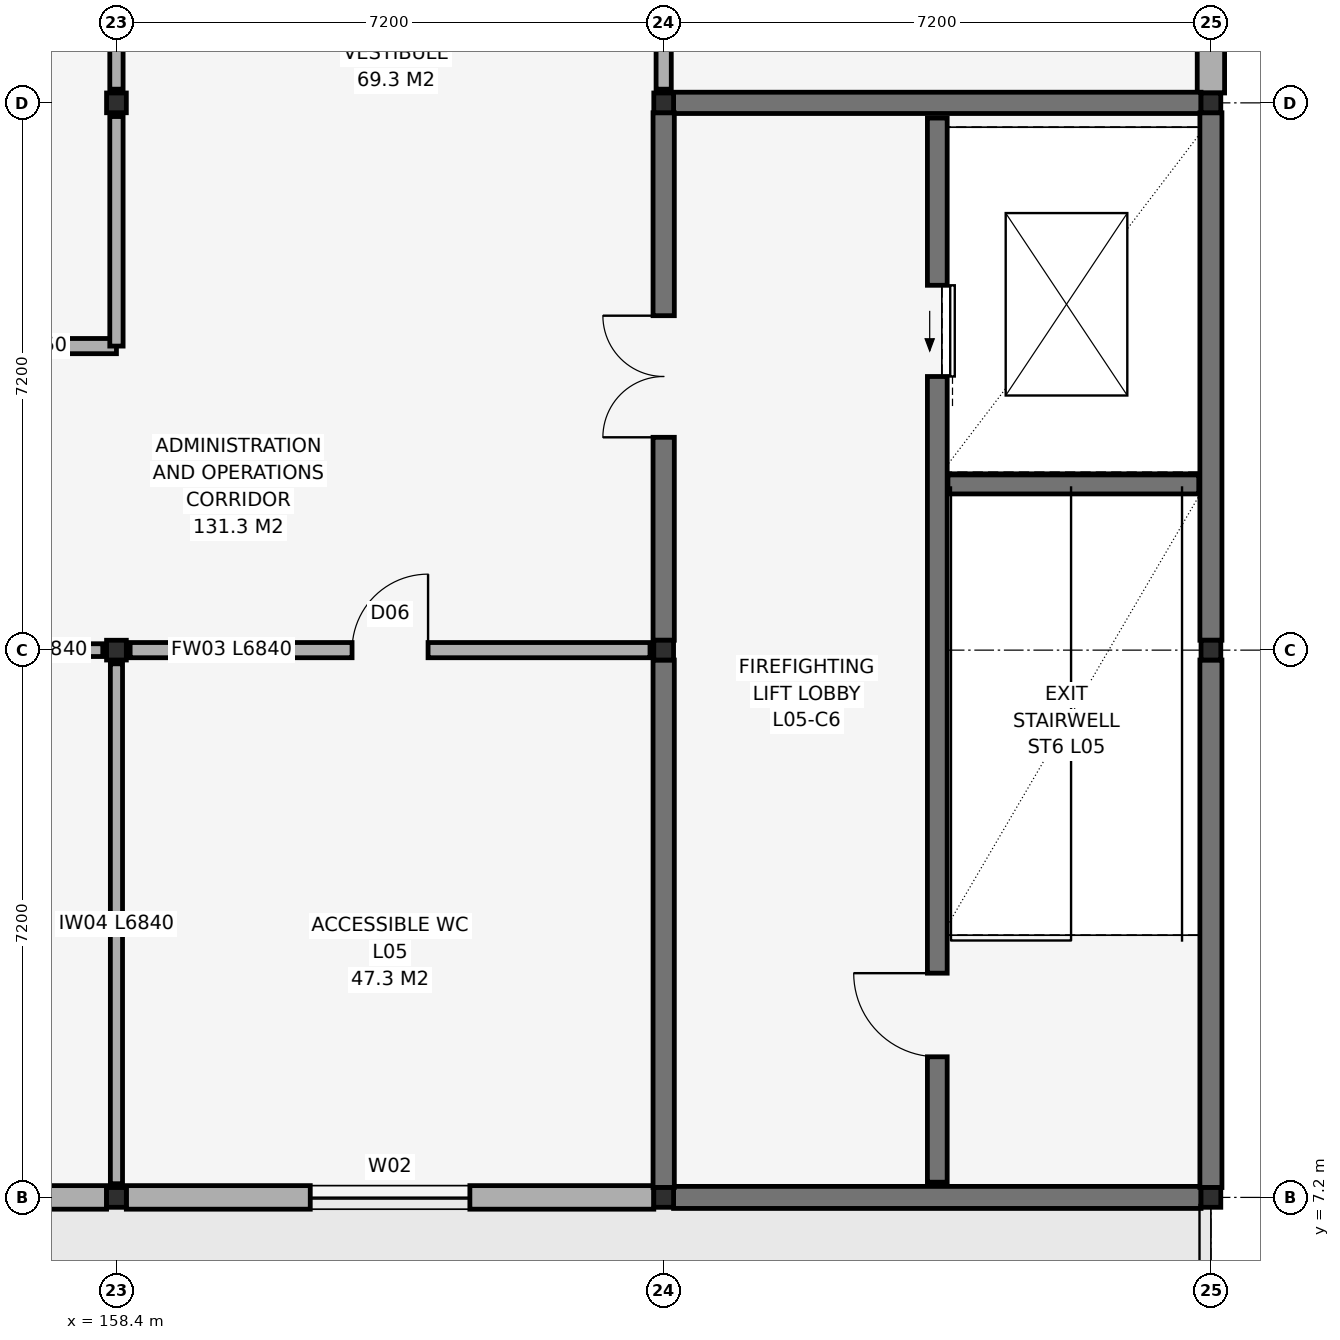
"""IFC4 building model, lengths in metres.
Left out: names, types, materials, properties, quantities, classifications, styles, units other than length and angle.
Written with IfcOpenShell. Run it as: python <this file> out.ifc"""

import sys

from ifc_helpers import new_model, si_unit, direction, frame, frame_2d, origin, origin_2d, place, context, subcontext, project, spatial, rectangle, hollow_rectangle, extrude, element, fill, save


model = new_model("IFC4")
c1 = context("Model", 3, precision=1e-05, world=origin(), true_north=direction((0.0, 1.0)))
c2 = subcontext(c1, "Body", "Model", "MODEL_VIEW")
j1 = project(units=[si_unit("LENGTHUNIT", "METRE"), si_unit("PLANEANGLEUNIT", "RADIAN")], contexts=[c1])
p1 = place(None, origin())
s1 = spatial("IfcSite", under=j1, at=p1, CompositionType="ELEMENT")
p2 = place(p1, origin())
s2 = spatial("IfcBuilding", under=s1, at=p2, CompositionType="ELEMENT")
p3 = place(p2, frame((0.0, 0.0, 23.4)))
s3 = spatial("IfcBuildingStorey", under=s2, at=p3, CompositionType="ELEMENT", Elevation=23.4)
for number, where, z_axis, x_axis in (
    (1, (158.4, 7.2, 0.0), (0.0, 0.0, 1.0), (1.0, 0.0, 0.0)),
    (2, (158.4, 14.4, 0.0), (0.0, 0.0, 1.0), (1.0, 0.0, 0.0)),
    (3, (158.4, 21.6, 0.0), (0.0, 0.0, 1.0), (1.0, 0.0, 0.0)),
    (4, (165.6, 7.2, 0.0), (0.0, 0.0, 1.0), (1.0, 0.0, 0.0)),
    (5, (165.6, 14.4, 0.0), (0.0, 0.0, 1.0), (1.0, 0.0, 0.0)),
    (6, (165.6, 21.6, 0.0), (0.0, 0.0, 1.0), (1.0, 0.0, 0.0)),
    (7, (172.8, 7.2, 0.0), (0.0, 0.0, 1.0), (1.0, 0.0, 0.0)),
    (8, (172.8, 14.4, 0.0), (0.0, 0.0, 1.0), (1.0, 0.0, 0.0)),
    (9, (172.8, 21.6, 0.0), (0.0, 0.0, 1.0), (1.0, 0.0, 0.0)),
):
    element("IfcColumn", number, at=place(p3, frame(where, z_axis=z_axis, x_axis=x_axis)), inside=s3, PredefinedType="COLUMN", context=c2, shape_type="SweptSolid", body=[
        extrude(hollow_rectangle(XDim=0.26, YDim=0.26, WallThickness=0.012, at=origin_2d()), origin(), (0.0, 0.0, 1.0), 4.2),
    ])
p4 = place(p3, frame((151.33, 7.2, 0.0), z_axis=(0.0, 0.0, 1.0), x_axis=(1.0, 0.0, 0.0)))
e10 = element("IfcWall", 10, at=p4, inside=s3, PredefinedType="SOLIDWALL", context=c2, shape_type="SweptSolid", body=[
    extrude(rectangle(XDim=6.94, YDim=0.31, at=frame_2d((3.47, 0.0))), origin(), (0.0, 0.0, 1.0), 3.98),
])
p5 = place(p4, frame((2.07, 0.0, 0.95)))
e11 = element("IfcOpeningElement", 11, at=p5, cuts=e10, PredefinedType="OPENING", context=c2, shape_type="SweptSolid", body=[
    extrude(rectangle(XDim=2.8, YDim=1.5, at=frame_2d((1.4, 0.75))), frame((0.0, 0.17, 0.0), z_axis=(0.0, -1.0, 0.0), x_axis=(1.0, 0.0, 0.0)), (0.0, 0.0, 1.0), 0.34),
])
p6 = place(p3, frame((158.53, 7.2, 0.0), z_axis=(0.0, 0.0, 1.0), x_axis=(1.0, 0.0, 0.0)))
e12 = element("IfcWall", 12, at=p6, inside=s3, PredefinedType="SOLIDWALL", context=c2, shape_type="SweptSolid", body=[
    extrude(rectangle(XDim=6.94, YDim=0.31, at=frame_2d((3.47, 0.0))), origin(), (0.0, 0.0, 1.0), 3.98),
])
p7 = place(p6, frame((2.42, 0.0, 0.95)))
e13 = element("IfcOpeningElement", 13, at=p7, cuts=e12, PredefinedType="OPENING", context=c2, shape_type="SweptSolid", body=[
    extrude(rectangle(XDim=2.1, YDim=2.65, at=frame_2d((1.05, 1.325))), frame((0.0, 0.17, 0.0), z_axis=(0.0, -1.0, 0.0), x_axis=(1.0, 0.0, 0.0)), (0.0, 0.0, 1.0), 0.34),
])
p8 = place(p3, frame((172.8, 21.73, 0.0), z_axis=(0.0, 0.0, 1.0), x_axis=(0.0, 1.0, 0.0)))
e14 = element("IfcWall", 14, at=p8, inside=s3, PredefinedType="SOLIDWALL", context=c2, shape_type="SweptSolid", body=[
    extrude(rectangle(XDim=6.94, YDim=0.36, at=frame_2d((3.47, 0.0))), origin(), (0.0, 0.0, 1.0), 3.98),
])
p9 = place(p8, frame((2.42, 0.0, 0.95)))
e15 = element("IfcOpeningElement", 15, at=p9, cuts=e14, PredefinedType="OPENING", context=c2, shape_type="SweptSolid", body=[
    extrude(rectangle(XDim=2.1, YDim=2.65, at=frame_2d((1.05, 1.325))), frame((0.0, 0.195, 0.0), z_axis=(0.0, -1.0, 0.0), x_axis=(1.0, 0.0, 0.0)), (0.0, 0.0, 1.0), 0.39),
])
p10 = place(p3, frame((165.73, 7.2, 0.0), z_axis=(0.0, 0.0, 1.0), x_axis=(1.0, 0.0, 0.0)))
e16 = element("IfcWall", 16, at=p10, inside=s3, PredefinedType="SHEAR", context=c2, shape_type="SweptSolid", body=[
    extrude(rectangle(XDim=6.94, YDim=0.29, at=frame_2d((3.47, 0.0))), origin(), (0.0, 0.0, 1.0), 4.0),
])
for number, where, z_axis, x_axis in (
    (17, (165.73, 21.6, 0.0), (0.0, 0.0, 1.0), (1.0, 0.0, 0.0)),
    (18, (165.6, 7.33, 0.0), (0.0, 0.0, 1.0), (0.0, 1.0, 0.0)),
):
    element("IfcWall", number, at=place(p3, frame(where, z_axis=z_axis, x_axis=x_axis)), inside=s3, PredefinedType="SHEAR", context=c2, shape_type="SweptSolid", body=[
        extrude(rectangle(XDim=6.94, YDim=0.28, at=frame_2d((3.47, 0.0))), origin(), (0.0, 0.0, 1.0), 4.0),
    ])
p11 = place(p3, frame((165.6, 14.53, 0.0), z_axis=(0.0, 0.0, 1.0), x_axis=(0.0, 1.0, 0.0)))
e19 = element("IfcWall", 19, at=p11, inside=s3, PredefinedType="SHEAR", context=c2, shape_type="SweptSolid", body=[
    extrude(rectangle(XDim=6.94, YDim=0.28, at=frame_2d((3.47, 0.0))), origin(), (0.0, 0.0, 1.0), 4.0),
])
p12 = place(p11, frame((2.67, 0.0, 0.0)))
e20 = element("IfcOpeningElement", 20, at=p12, cuts=e19, PredefinedType="OPENING", context=c2, shape_type="SweptSolid", body=[
    extrude(rectangle(XDim=1.6, YDim=2.2, at=frame_2d((0.8, 1.1))), frame((0.0, 0.155, 0.0), z_axis=(0.0, -1.0, 0.0), x_axis=(1.0, 0.0, 0.0)), (0.0, 0.0, 1.0), 0.31),
])
for number, where, z_axis, x_axis in (
    (21, (172.8, 7.33, 0.0), (0.0, 0.0, 1.0), (0.0, 1.0, 0.0)),
    (22, (172.8, 14.53, 0.0), (0.0, 0.0, 1.0), (0.0, 1.0, 0.0)),
):
    element("IfcWall", number, at=place(p3, frame(where, z_axis=z_axis, x_axis=x_axis)), inside=s3, PredefinedType="SHEAR", context=c2, shape_type="SweptSolid", body=[
        extrude(rectangle(XDim=6.94, YDim=0.29, at=frame_2d((3.47, 0.0))), origin(), (0.0, 0.0, 1.0), 4.0),
    ])
p13 = place(p3, frame((169.2, 7.4, 0.0), z_axis=(0.0, 0.0, 1.0), x_axis=(0.0, 1.0, 0.0)))
e23 = element("IfcWall", 23, at=p13, inside=s3, PredefinedType="SHEAR", context=c2, shape_type="SweptSolid", body=[
    extrude(rectangle(XDim=14.0, YDim=0.26, at=frame_2d((7.0, 0.0))), origin(), (0.0, 0.0, 1.0), 4.0),
])
p14 = place(p13, frame((1.65, 0.0, 0.0)))
e24 = element("IfcOpeningElement", 24, at=p14, cuts=e23, PredefinedType="OPENING", context=c2, shape_type="SweptSolid", body=[
    extrude(rectangle(XDim=1.1, YDim=2.15, at=frame_2d((0.55, 1.075))), frame((0.0, 0.145, 0.0), z_axis=(0.0, -1.0, 0.0), x_axis=(1.0, 0.0, 0.0)), (0.0, 0.0, 1.0), 0.29),
])
p15 = place(p13, frame((10.6, 0.0, 0.0)))
e25 = element("IfcOpeningElement", 25, at=p15, cuts=e23, PredefinedType="OPENING", context=c2, shape_type="SweptSolid", body=[
    extrude(rectangle(XDim=1.2, YDim=2.25, at=frame_2d((0.6, 1.125))), frame((0.0, 0.145, 0.0), z_axis=(0.0, -1.0, 0.0), x_axis=(1.0, 0.0, 0.0)), (0.0, 0.0, 1.0), 0.29),
])
p16 = place(p3, frame((169.34, 16.58, 0.0), z_axis=(0.0, 0.0, 1.0), x_axis=(1.0, 0.0, 0.0)))
e26 = element("IfcWall", 26, at=p16, inside=s3, PredefinedType="SHEAR", context=c2, shape_type="SweptSolid", body=[
    extrude(rectangle(XDim=3.3, YDim=0.25, at=frame_2d((1.65, 0.0))), origin(), (0.0, 0.0, 1.0), 4.0),
])
p17 = place(p3, frame((151.38, 14.4, 0.0), z_axis=(0.0, 0.0, 1.0), x_axis=(1.0, 0.0, 0.0)))
e27 = element("IfcWall", 27, at=p17, inside=s3, PredefinedType="PARTITIONING", context=c2, shape_type="SweptSolid", body=[
    extrude(rectangle(XDim=6.84, YDim=0.168, at=frame_2d((3.42, 0.0))), origin(), (0.0, 0.0, 1.0), 3.98),
])
p18 = place(p17, frame((2.17, 0.0, 0.95)))
e28 = element("IfcOpeningElement", 28, at=p18, cuts=e27, PredefinedType="OPENING", context=c2, shape_type="SweptSolid", body=[
    extrude(rectangle(XDim=2.5, YDim=1.35, at=frame_2d((1.25, 0.675))), frame((0.0, 0.099, 0.0), z_axis=(0.0, -1.0, 0.0), x_axis=(1.0, 0.0, 0.0)), (0.0, 0.0, 1.0), 0.198),
])
p19 = place(p3, frame((158.4, 7.38, 0.0), z_axis=(0.0, 0.0, 1.0), x_axis=(0.0, 1.0, 0.0)))
e29 = element("IfcWall", 29, at=p19, inside=s3, PredefinedType="PARTITIONING", context=c2, shape_type="SweptSolid", body=[
    extrude(rectangle(XDim=6.84, YDim=0.16, at=frame_2d((3.42, 0.0))), origin(), (0.0, 0.0, 1.0), 3.98),
])
p20 = place(p3, frame((158.58, 14.4, 0.0), z_axis=(0.0, 0.0, 1.0), x_axis=(1.0, 0.0, 0.0)))
e30 = element("IfcWall", 30, at=p20, inside=s3, PredefinedType="SOLIDWALL", context=c2, shape_type="SweptSolid", body=[
    extrude(rectangle(XDim=6.84, YDim=0.2, at=frame_2d((3.42, 0.0))), origin(), (0.0, 0.0, 1.0), 3.98),
])
p21 = place(p20, frame((2.92, 0.0, 0.0)))
e31 = element("IfcOpeningElement", 31, at=p21, cuts=e30, PredefinedType="OPENING", context=c2, shape_type="SweptSolid", body=[
    extrude(rectangle(XDim=1.0, YDim=2.1, at=frame_2d((0.5, 1.05))), frame((0.0, 0.115, 0.0), z_axis=(0.0, -1.0, 0.0), x_axis=(1.0, 0.0, 0.0)), (0.0, 0.0, 1.0), 0.23),
])
p22 = place(p3, frame((151.35, 18.4, 0.0), z_axis=(0.0, 0.0, 1.0), x_axis=(1.0, 0.0, 0.0)))
e32 = element("IfcWall", 32, at=p22, inside=s3, PredefinedType="SOLIDWALL", context=c2, shape_type="SweptSolid", body=[
    extrude(rectangle(XDim=7.05, YDim=0.2, at=frame_2d((3.525, 0.0))), origin(), (0.0, 0.0, 1.0), 3.98),
])
p23 = place(p22, frame((2.99, 0.0, 0.0)))
e33 = element("IfcOpeningElement", 33, at=p23, cuts=e32, PredefinedType="OPENING", context=c2, shape_type="SweptSolid", body=[
    extrude(rectangle(XDim=0.92, YDim=2.1, at=frame_2d((0.46, 1.05))), frame((0.0, 0.115, 0.0), z_axis=(0.0, -1.0, 0.0), x_axis=(1.0, 0.0, 0.0)), (0.0, 0.0, 1.0), 0.23),
])
p24 = place(p3, frame((158.4, 18.4, 0.0), z_axis=(0.0, 0.0, 1.0), x_axis=(0.0, 1.0, 0.0)))
e34 = element("IfcWall", 34, at=p24, inside=s3, PredefinedType="PARTITIONING", context=c2, shape_type="SweptSolid", body=[
    extrude(rectangle(XDim=3.02, YDim=0.175, at=frame_2d((1.51, 0.0))), origin(), (0.0, 0.0, 1.0), 3.98),
])
p25 = place(p3, frame((158.4, 21.78, 0.0), z_axis=(0.0, 0.0, 1.0), x_axis=(0.0, 1.0, 0.0)))
e35 = element("IfcWall", 35, at=p25, inside=s3, PredefinedType="PARTITIONING", context=c2, shape_type="SweptSolid", body=[
    extrude(rectangle(XDim=6.84, YDim=0.175, at=frame_2d((3.42, 0.0))), origin(), (0.0, 0.0, 1.0), 3.98),
])
p26 = place(p3, frame((165.6, 21.78, 0.0), z_axis=(0.0, 0.0, 1.0), x_axis=(0.0, 1.0, 0.0)))
e36 = element("IfcWall", 36, at=p26, inside=s3, PredefinedType="SOLIDWALL", context=c2, shape_type="SweptSolid", body=[
    extrude(rectangle(XDim=6.84, YDim=0.2, at=frame_2d((3.42, 0.0))), origin(), (0.0, 0.0, 1.0), 3.98),
])
p27 = place(p26, frame((2.945, 0.0, 0.0)))
e37 = element("IfcOpeningElement", 37, at=p27, cuts=e36, PredefinedType="OPENING", context=c2, shape_type="SweptSolid", body=[
    extrude(rectangle(XDim=0.95, YDim=2.1, at=frame_2d((0.475, 1.05))), frame((0.0, 0.115, 0.0), z_axis=(0.0, -1.0, 0.0), x_axis=(1.0, 0.0, 0.0)), (0.0, 0.0, 1.0), 0.23),
])
p28 = place(p7, origin())
e38 = element("IfcWindow", 38, at=p28, inside=s3, PartitioningType="SINGLE_PANEL", PredefinedType="WINDOW", context=c2, shape_type="SweptSolid", body=[
    extrude(rectangle(XDim=2.1, YDim=2.65, at=frame_2d((1.05, 1.325))), frame((0.0, 0.03, 0.0), z_axis=(0.0, -1.0, 0.0), x_axis=(1.0, 0.0, 0.0)), (0.0, 0.0, 1.0), 0.06),
])
fill(e13, e38)
p29 = place(p14, frame((1.1, 0.0, 0.0), z_axis=(0.0, 0.0, 1.0), x_axis=(-1.0, 0.0, 0.0)))
e39 = element("IfcDoor", 39, at=p29, inside=s3, OperationType="SINGLE_SWING_LEFT", PredefinedType="DOOR", context=c2, shape_type="SweptSolid", body=[
    extrude(rectangle(XDim=1.1, YDim=2.15, at=frame_2d((0.55, 1.075))), frame((0.0, 0.025, 0.0), z_axis=(0.0, -1.0, 0.0), x_axis=(1.0, 0.0, 0.0)), (0.0, 0.0, 1.0), 0.05),
])
fill(e24, e39)
p30 = place(p15, origin())
e40 = element("IfcDoor", 40, at=p30, inside=s3, OperationType="SLIDING_TO_LEFT", PredefinedType="DOOR", context=c2, shape_type="SweptSolid", body=[
    extrude(rectangle(XDim=1.2, YDim=2.25, at=frame_2d((0.6, 1.125))), frame((0.0, 0.025, 0.0), z_axis=(0.0, -1.0, 0.0), x_axis=(1.0, 0.0, 0.0)), (0.0, 0.0, 1.0), 0.05),
])
fill(e25, e40)
p31 = place(p12, origin())
e41 = element("IfcDoor", 41, at=p31, inside=s3, OperationType="DOUBLE_SWING_LEFT", PredefinedType="DOOR", context=c2, shape_type="SweptSolid", body=[
    extrude(rectangle(XDim=1.6, YDim=2.2, at=frame_2d((0.8, 1.1))), frame((0.0, 0.025, 0.0), z_axis=(0.0, -1.0, 0.0), x_axis=(1.0, 0.0, 0.0)), (0.0, 0.0, 1.0), 0.05),
])
fill(e20, e41)
p32 = place(p21, frame((1.0, 0.0, 0.0), z_axis=(0.0, 0.0, 1.0), x_axis=(-1.0, 0.0, 0.0)))
e42 = element("IfcDoor", 42, at=p32, inside=s3, OperationType="SINGLE_SWING_LEFT", PredefinedType="DOOR", context=c2, shape_type="SweptSolid", body=[
    extrude(rectangle(XDim=1.0, YDim=2.1, at=frame_2d((0.5, 1.05))), frame((0.0, 0.025, 0.0), z_axis=(0.0, -1.0, 0.0), x_axis=(1.0, 0.0, 0.0)), (0.0, 0.0, 1.0), 0.05),
])
fill(e31, e42)
save(model, sys.argv[1])
